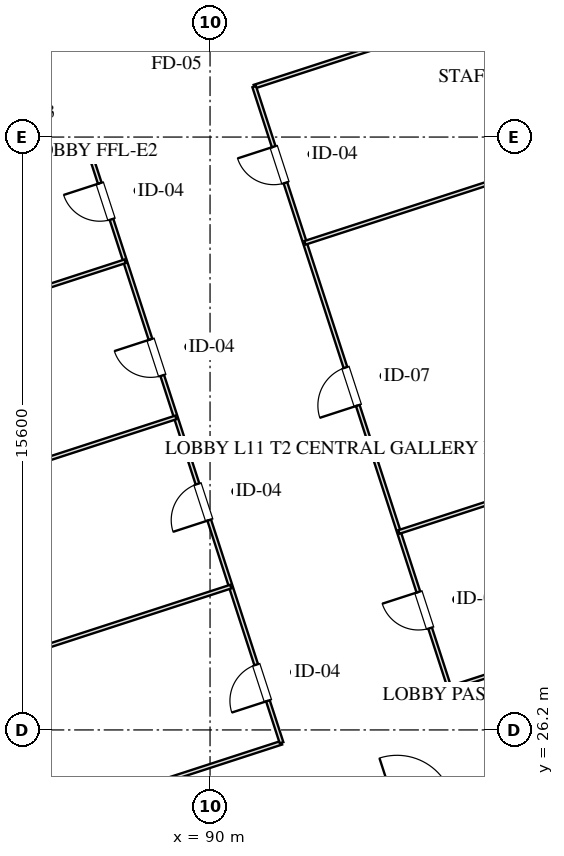
"""IFC4 building model, lengths in metres.
Left out: names, types, materials, properties, quantities, classifications, styles, units other than length and angle.
Written with IfcOpenShell. Run it as: python <this file> out.ifc"""

import sys

from ifc_helpers import new_model, si_unit, direction, frame, frame_2d, origin, place, context, subcontext, project, spatial, rectangle, extrude, element, fill, save


model = new_model("IFC4")
c1 = context("Model", 3, precision=1e-05, world=origin(), true_north=direction((0.0, 1.0)))
c2 = subcontext(c1, "Body", "Model", "MODEL_VIEW")
j1 = project(units=[si_unit("LENGTHUNIT", "METRE"), si_unit("PLANEANGLEUNIT", "RADIAN")], contexts=[c1])
p1 = place(None, origin())
s1 = spatial("IfcSite", under=j1, at=p1, CompositionType="ELEMENT")
p2 = place(p1, origin())
s2 = spatial("IfcBuilding", under=s1, at=p2, CompositionType="ELEMENT")
p3 = place(p2, frame((0.0, 0.0, 50.6)))
s3 = spatial("IfcBuildingStorey", under=s2, at=p3, CompositionType="ELEMENT", Elevation=50.6)
p4 = place(p3, frame((93.542, 23.585, 0.0), z_axis=(0.0, 0.0, 1.0), x_axis=(0.951063829732, 0.308994485023, 0.0)))
e1 = element("IfcWall", 1, at=p4, inside=s3, PredefinedType="PARTITIONING", context=c2, shape_type="SweptSolid", body=[
    extrude(rectangle(XDim=4.4, YDim=0.15, at=frame_2d((2.2, 0.0))), origin(), (0.0, 0.0, 1.0), 3.175),
])
p5 = place(p4, frame((1.45, 0.0, 0.0)))
e2 = element("IfcOpeningElement", 2, at=p5, cuts=e1, PredefinedType="OPENING", context=c2, shape_type="SweptSolid", body=[
    extrude(rectangle(XDim=1.5, YDim=2.05, at=frame_2d((0.75, 1.025))), frame((0.0, 0.085, 0.0), z_axis=(0.0, -1.0, 0.0), x_axis=(1.0, 0.0, 0.0)), (0.0, 0.0, 1.0), 0.17),
])
p6 = place(p3, frame((83.101, 43.324, 0.0), z_axis=(0.0, 0.0, 1.0), x_axis=(0.951052804469, 0.309028417967, 0.0)))
e3 = element("IfcWall", 3, at=p6, inside=s3, PredefinedType="PARTITIONING", context=c2, shape_type="SweptSolid", body=[
    extrude(rectangle(XDim=3.83, YDim=0.2, at=frame_2d((1.915, 0.0))), origin(), (0.0, 0.0, 1.0), 3.175),
])
p7 = place(p6, frame((1.35, 0.0, 0.0)))
e4 = element("IfcOpeningElement", 4, at=p7, cuts=e3, PredefinedType="OPENING", context=c2, shape_type="SweptSolid", body=[
    extrude(rectangle(XDim=1.2, YDim=2.05, at=frame_2d((0.6, 1.025))), frame((0.0, 0.11, 0.0), z_axis=(0.0, -1.0, 0.0), x_axis=(1.0, 0.0, 0.0)), (0.0, 0.0, 1.0), 0.22),
])
p8 = place(p3, frame((74.691, 20.278, 0.0), z_axis=(0.0, 0.0, 1.0), x_axis=(0.951053521786, 0.309026210375, 0.0)))
e5 = element("IfcWall", 5, at=p8, inside=s3, PredefinedType="MOVABLE", context=c2, shape_type="SweptSolid", body=[
    extrude(rectangle(XDim=18.075, YDim=0.1, at=frame_2d((9.038, 0.0))), origin(), (0.0, 0.0, 1.0), 3.175),
])
p9 = place(p3, frame((96.304, 27.3, 0.0), z_axis=(0.0, 0.0, 1.0), x_axis=(0.951055535739, 0.309020012199, 0.0)))
e6 = element("IfcWall", 6, at=p9, inside=s3, PredefinedType="MOVABLE", context=c2, shape_type="SweptSolid", body=[
    extrude(rectangle(XDim=14.875, YDim=0.1, at=frame_2d((7.438, 0.0))), origin(), (0.0, 0.0, 1.0), 3.175),
])
p10 = place(p3, frame((69.549, 36.103, 0.0), z_axis=(0.0, 0.0, 1.0), x_axis=(0.951057491432, 0.309013993197, 0.0)))
e7 = element("IfcWall", 7, at=p10, inside=s3, PredefinedType="MOVABLE", context=c2, shape_type="SweptSolid", body=[
    extrude(rectangle(XDim=18.075, YDim=0.1, at=frame_2d((9.038, 0.0))), origin(), (0.0, 0.0, 1.0), 3.175),
])
p11 = place(p3, frame((91.162, 43.126, 0.0), z_axis=(0.0, 0.0, 1.0), x_axis=(0.951055535739, 0.309020012199, 0.0)))
e8 = element("IfcWall", 8, at=p11, inside=s3, PredefinedType="MOVABLE", context=c2, shape_type="SweptSolid", body=[
    extrude(rectangle(XDim=14.875, YDim=0.1, at=frame_2d((7.438, 0.0))), origin(), (0.0, 0.0, 1.0), 3.175),
])
p12 = place(p3, frame((91.882, 25.863, 0.0), z_axis=(0.0, 0.0, 1.0), x_axis=(-0.309022042254, 0.951054876125, 0.0)))
e9 = element("IfcWall", 9, at=p12, inside=s3, PredefinedType="MOVABLE", context=c2, shape_type="SweptSolid", body=[
    extrude(rectangle(XDim=16.64, YDim=0.1, at=frame_2d((8.32, 0.0))), origin(), (0.0, 0.0, 1.0), 3.175),
])
p13 = place(p12, frame((1.16, 0.0, 0.0)))
e10 = element("IfcOpeningElement", 10, at=p13, cuts=e9, PredefinedType="OPENING", context=c2, shape_type="SweptSolid", body=[
    extrude(rectangle(XDim=1.0, YDim=2.05, at=frame_2d((0.5, 1.025))), frame((0.0, 0.06, 0.0), z_axis=(0.0, -1.0, 0.0), x_axis=(1.0, 0.0, 0.0)), (0.0, 0.0, 1.0), 0.12),
])
p14 = place(p12, frame((6.16, 0.0, 0.0)))
e11 = element("IfcOpeningElement", 11, at=p14, cuts=e9, PredefinedType="OPENING", context=c2, shape_type="SweptSolid", body=[
    extrude(rectangle(XDim=1.0, YDim=2.05, at=frame_2d((0.5, 1.025))), frame((0.0, 0.06, 0.0), z_axis=(0.0, -1.0, 0.0), x_axis=(1.0, 0.0, 0.0)), (0.0, 0.0, 1.0), 0.12),
])
p15 = place(p12, frame((10.16, 0.0, 0.0)))
e12 = element("IfcOpeningElement", 12, at=p15, cuts=e9, PredefinedType="OPENING", context=c2, shape_type="SweptSolid", body=[
    extrude(rectangle(XDim=1.0, YDim=2.05, at=frame_2d((0.5, 1.025))), frame((0.0, 0.06, 0.0), z_axis=(0.0, -1.0, 0.0), x_axis=(1.0, 0.0, 0.0)), (0.0, 0.0, 1.0), 0.12),
])
p16 = place(p12, frame((14.48, 0.0, 0.0)))
e13 = element("IfcOpeningElement", 13, at=p16, cuts=e9, PredefinedType="OPENING", context=c2, shape_type="SweptSolid", body=[
    extrude(rectangle(XDim=1.0, YDim=2.05, at=frame_2d((0.5, 1.025))), frame((0.0, 0.06, 0.0), z_axis=(0.0, -1.0, 0.0), x_axis=(1.0, 0.0, 0.0)), (0.0, 0.0, 1.0), 0.12),
])
p17 = place(p3, frame((96.304, 27.3, 0.0), z_axis=(0.0, 0.0, 1.0), x_axis=(-0.30901773025, 0.951056277195, 0.0)))
e14 = element("IfcWall", 14, at=p17, inside=s3, PredefinedType="MOVABLE", context=c2, shape_type="SweptSolid", body=[
    extrude(rectangle(XDim=16.64, YDim=0.1, at=frame_2d((8.32, 0.0))), origin(), (0.0, 0.0, 1.0), 3.175),
])
p18 = place(p17, frame((1.66, 0.0, 0.0)))
e15 = element("IfcOpeningElement", 15, at=p18, cuts=e14, PredefinedType="OPENING", context=c2, shape_type="SweptSolid", body=[
    extrude(rectangle(XDim=1.0, YDim=2.05, at=frame_2d((0.5, 1.025))), frame((0.0, 0.06, 0.0), z_axis=(0.0, -1.0, 0.0), x_axis=(1.0, 0.0, 0.0)), (0.0, 0.0, 1.0), 0.12),
])
p19 = place(p17, frame((7.82, 0.0, 0.0)))
e16 = element("IfcOpeningElement", 16, at=p19, cuts=e14, PredefinedType="OPENING", context=c2, shape_type="SweptSolid", body=[
    extrude(rectangle(XDim=1.05, YDim=2.05, at=frame_2d((0.525, 1.025))), frame((0.0, 0.06, 0.0), z_axis=(0.0, -1.0, 0.0), x_axis=(1.0, 0.0, 0.0)), (0.0, 0.0, 1.0), 0.12),
])
p20 = place(p17, frame((13.98, 0.0, 0.0)))
e17 = element("IfcOpeningElement", 17, at=p20, cuts=e14, PredefinedType="OPENING", context=c2, shape_type="SweptSolid", body=[
    extrude(rectangle(XDim=1.0, YDim=2.05, at=frame_2d((0.5, 1.025))), frame((0.0, 0.06, 0.0), z_axis=(0.0, -1.0, 0.0), x_axis=(1.0, 0.0, 0.0)), (0.0, 0.0, 1.0), 0.12),
])
for number, where, z_axis, x_axis in (
    (18, (73.356, 24.386, 0.0), (0.0, 0.0, 1.0), (0.951, 0.309, 0.0)),
    (19, (71.91, 28.837, 0.0), (0.0, 0.0, 1.0), (0.951, 0.309, 0.0)),
    (20, (70.575, 32.946, 0.0), (0.0, 0.0, 1.0), (0.951, 0.309, 0.0)),
):
    element("IfcWall", number, at=place(p3, frame(where, z_axis=z_axis, x_axis=x_axis)), inside=s3, PredefinedType="MOVABLE", context=c2, shape_type="SweptSolid", body=[
        extrude(rectangle(XDim=18.075, YDim=0.1, at=frame_2d((9.038, 0.0))), origin(), (0.0, 0.0, 1.0), 3.175),
    ])
for number, where, z_axis, x_axis in (
    (21, (94.969, 31.409, 0.0), (0.0, 0.0, 1.0), (0.951, 0.309, 0.0)),
    (22, (92.497, 39.017, 0.0), (0.0, 0.0, 1.0), (0.951, 0.309, 0.0)),
):
    element("IfcWall", number, at=place(p3, frame(where, z_axis=z_axis, x_axis=x_axis)), inside=s3, PredefinedType="MOVABLE", context=c2, shape_type="SweptSolid", body=[
        extrude(rectangle(XDim=14.875, YDim=0.1, at=frame_2d((7.438, 0.0))), origin(), (0.0, 0.0, 1.0), 3.175),
    ])
p21 = place(p13, origin())
e23 = element("IfcDoor", 23, at=p21, inside=s3, OperationType="SINGLE_SWING_LEFT", PredefinedType="DOOR", context=c2, shape_type="SweptSolid", body=[
    extrude(rectangle(XDim=1.0, YDim=2.05, at=frame_2d((0.5, 1.025))), frame((0.0, 0.025, 0.0), z_axis=(0.0, -1.0, 0.0), x_axis=(1.0, 0.0, 0.0)), (0.0, 0.0, 1.0), 0.05),
])
fill(e10, e23)
p22 = place(p14, origin())
e24 = element("IfcDoor", 24, at=p22, inside=s3, OperationType="SINGLE_SWING_LEFT", PredefinedType="DOOR", context=c2, shape_type="SweptSolid", body=[
    extrude(rectangle(XDim=1.0, YDim=2.05, at=frame_2d((0.5, 1.025))), frame((0.0, 0.025, 0.0), z_axis=(0.0, -1.0, 0.0), x_axis=(1.0, 0.0, 0.0)), (0.0, 0.0, 1.0), 0.05),
])
fill(e11, e24)
p23 = place(p15, origin())
e25 = element("IfcDoor", 25, at=p23, inside=s3, OperationType="SINGLE_SWING_RIGHT", PredefinedType="DOOR", context=c2, shape_type="SweptSolid", body=[
    extrude(rectangle(XDim=1.0, YDim=2.05, at=frame_2d((0.5, 1.025))), frame((0.0, 0.025, 0.0), z_axis=(0.0, -1.0, 0.0), x_axis=(1.0, 0.0, 0.0)), (0.0, 0.0, 1.0), 0.05),
])
fill(e12, e25)
p24 = place(p16, origin())
e26 = element("IfcDoor", 26, at=p24, inside=s3, OperationType="SINGLE_SWING_RIGHT", PredefinedType="DOOR", context=c2, shape_type="SweptSolid", body=[
    extrude(rectangle(XDim=1.0, YDim=2.05, at=frame_2d((0.5, 1.025))), frame((0.0, 0.025, 0.0), z_axis=(0.0, -1.0, 0.0), x_axis=(1.0, 0.0, 0.0)), (0.0, 0.0, 1.0), 0.05),
])
fill(e13, e26)
p25 = place(p18, origin())
e27 = element("IfcDoor", 27, at=p25, inside=s3, OperationType="SINGLE_SWING_RIGHT", PredefinedType="DOOR", context=c2, shape_type="SweptSolid", body=[
    extrude(rectangle(XDim=1.0, YDim=2.05, at=frame_2d((0.5, 1.025))), frame((0.0, 0.025, 0.0), z_axis=(0.0, -1.0, 0.0), x_axis=(1.0, 0.0, 0.0)), (0.0, 0.0, 1.0), 0.05),
])
fill(e15, e27)
p26 = place(p19, origin())
e28 = element("IfcDoor", 28, at=p26, inside=s3, OperationType="SINGLE_SWING_LEFT", PredefinedType="DOOR", context=c2, shape_type="SweptSolid", body=[
    extrude(rectangle(XDim=1.05, YDim=2.05, at=frame_2d((0.525, 1.025))), frame((0.0, 0.025, 0.0), z_axis=(0.0, -1.0, 0.0), x_axis=(1.0, 0.0, 0.0)), (0.0, 0.0, 1.0), 0.05),
])
fill(e16, e28)
p27 = place(p20, origin())
e29 = element("IfcDoor", 29, at=p27, inside=s3, OperationType="SINGLE_SWING_RIGHT", PredefinedType="DOOR", context=c2, shape_type="SweptSolid", body=[
    extrude(rectangle(XDim=1.0, YDim=2.05, at=frame_2d((0.5, 1.025))), frame((0.0, 0.025, 0.0), z_axis=(0.0, -1.0, 0.0), x_axis=(1.0, 0.0, 0.0)), (0.0, 0.0, 1.0), 0.05),
])
fill(e17, e29)
save(model, sys.argv[1])
